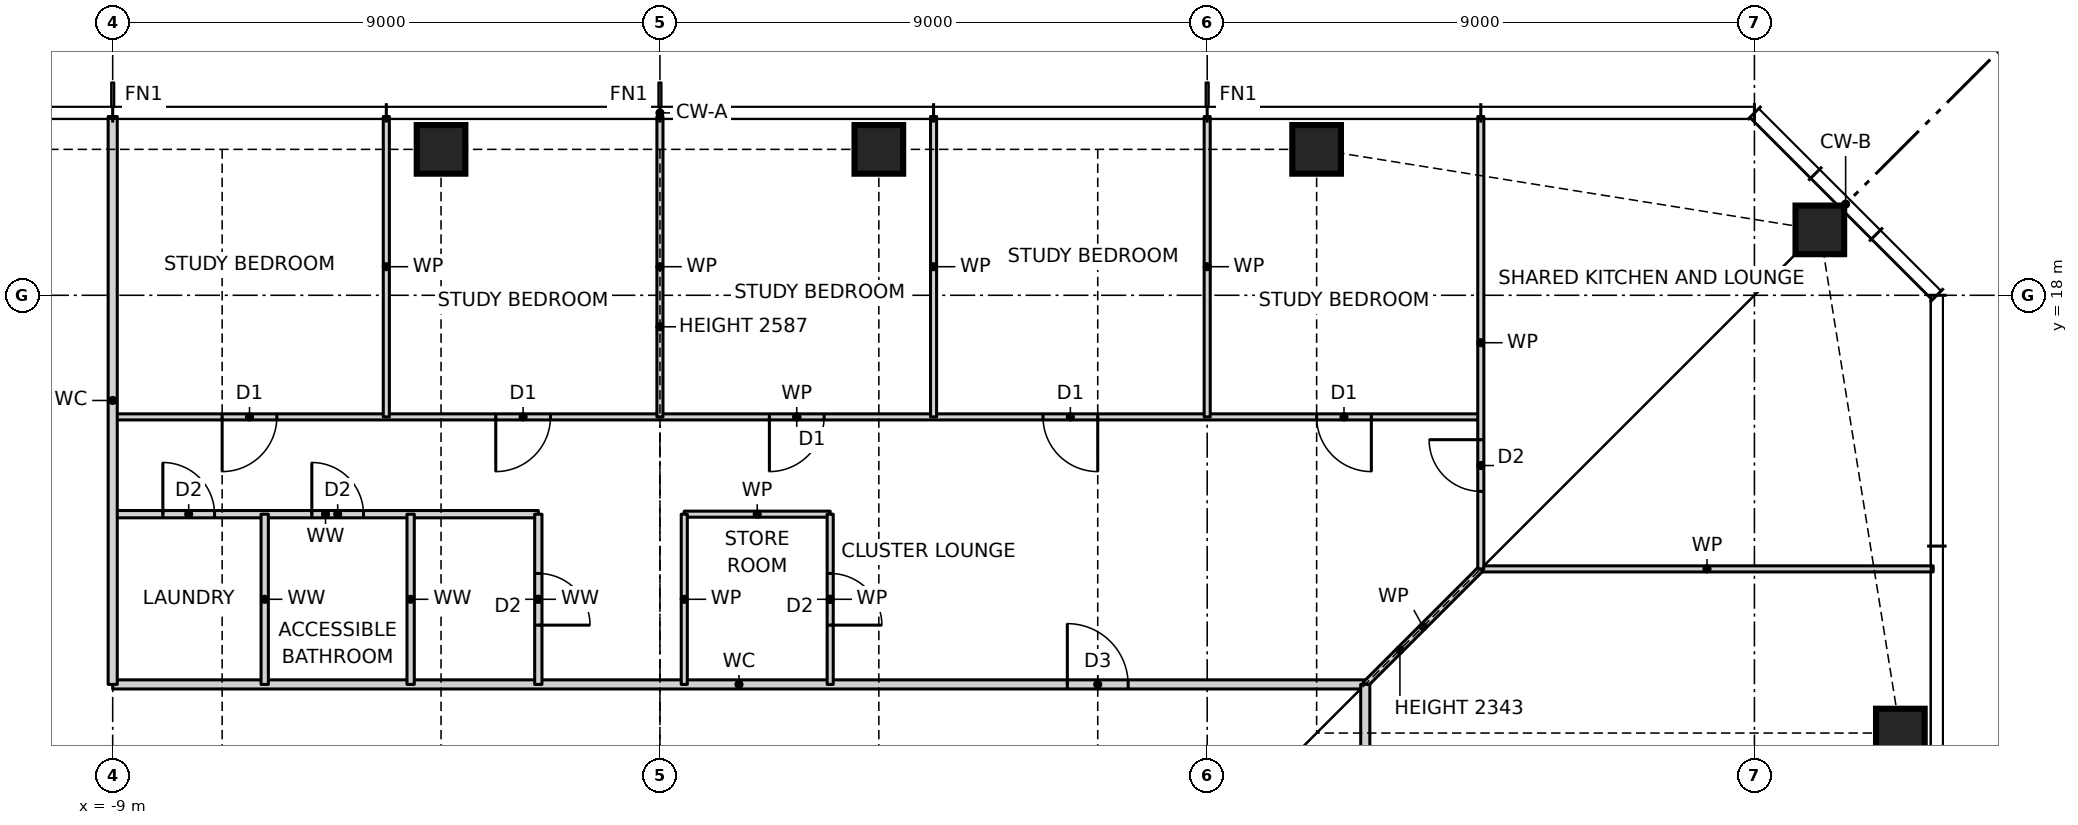
"""IFC4 building model, lengths in metres.
Left out: names, types, materials, properties, quantities, classifications, styles, units other than length and angle.
Written with IfcOpenShell. Run it as: python <this file> out.ifc"""

import sys

from ifc_helpers import new_model, si_unit, direction, frame, frame_2d, origin, origin_2d, place, context, subcontext, project, spatial, rectangle, hollow_rectangle, extrude, element, fill, save


model = new_model("IFC4")
c1 = context("Model", 3, precision=1e-05, world=origin(), true_north=direction((0.0, 1.0)))
c2 = subcontext(c1, "Body", "Model", "MODEL_VIEW")
j1 = project(units=[si_unit("LENGTHUNIT", "METRE"), si_unit("PLANEANGLEUNIT", "RADIAN")], contexts=[c1])
p1 = place(None, origin())
s1 = spatial("IfcSite", under=j1, at=p1, CompositionType="ELEMENT")
p2 = place(p1, origin())
s2 = spatial("IfcBuilding", under=s1, at=p2, CompositionType="ELEMENT")
p3 = place(p2, frame((0.0, 0.0, 129.5)))
s3 = spatial("IfcBuildingStorey", under=s2, at=p3, CompositionType="ELEMENT", Elevation=129.5)
for number, where, z_axis, x_axis in (
    (1, (20.4, 10.8, 0.0), (0.0, 0.0, 1.0), (1.0, 0.0, 0.0)),
    (2, (19.076, 19.076, 0.0), (0.0, 0.0, 1.0), (1.0, 0.0, 0.0)),
    (3, (10.8, 20.4, 0.0), (0.0, 0.0, 1.0), (1.0, 0.0, 0.0)),
    (4, (3.6, 20.4, 0.0), (0.0, 0.0, 1.0), (1.0, 0.0, 0.0)),
    (5, (-3.6, 20.4, 0.0), (0.0, 0.0, 1.0), (1.0, 0.0, 0.0)),
):
    element("IfcColumn", number, at=place(p3, frame(where, z_axis=z_axis, x_axis=x_axis)), inside=s3, PredefinedType="COLUMN", context=c2, shape_type="SweptSolid", body=[
        extrude(hollow_rectangle(XDim=0.8, YDim=0.8, WallThickness=0.07, at=origin_2d()), origin(), (0.0, 0.0, 1.0), 3.5),
    ])
p4 = place(p3, frame((-9.0, 11.6, 0.0), z_axis=(0.0, 0.0, 1.0), x_axis=(1.0, 0.0, 0.0)))
e6 = element("IfcWall", 6, at=p4, inside=s3, PredefinedType="PARTITIONING", context=c2, shape_type="SweptSolid", body=[
    extrude(rectangle(XDim=20.6, YDim=0.15, at=frame_2d((10.3, 0.0))), origin(), (0.0, 0.0, 1.0), 3.27),
])
p5 = place(p4, frame((15.7, 0.0, 0.0)))
e7 = element("IfcOpeningElement", 7, at=p5, cuts=e6, PredefinedType="OPENING", context=c2, shape_type="SweptSolid", body=[
    extrude(rectangle(XDim=1.0, YDim=2.1, at=frame_2d((0.5, 1.05))), frame((0.0, 0.085, 0.0), z_axis=(0.0, -1.0, 0.0), x_axis=(1.0, 0.0, 0.0)), (0.0, 0.0, 1.0), 0.17),
])
p6 = place(p3, frame((13.5, 13.5, 0.0), z_axis=(0.0, 0.0, 1.0), x_axis=(1.0, 0.0, 0.0)))
e8 = element("IfcWall", 8, at=p6, inside=s3, PredefinedType="PARTITIONING", context=c2, shape_type="SweptSolid", body=[
    extrude(rectangle(XDim=7.44, YDim=0.1, at=frame_2d((3.72, 0.0))), origin(), (0.0, 0.0, 1.0), 3.27),
])
p7 = place(p3, frame((-9.0, 14.4, 0.0), z_axis=(0.0, 0.0, 1.0), x_axis=(1.0, 0.0, 0.0)))
e9 = element("IfcWall", 9, at=p7, inside=s3, PredefinedType="PARTITIONING", context=c2, shape_type="SweptSolid", body=[
    extrude(rectangle(XDim=7.0, YDim=0.12, at=frame_2d((3.5, 0.0))), origin(), (0.0, 0.0, 1.0), 3.27),
])
p8 = place(p7, frame((3.275, 0.0, 0.0)))
e10 = element("IfcOpeningElement", 10, at=p8, cuts=e9, PredefinedType="OPENING", context=c2, shape_type="SweptSolid", body=[
    extrude(rectangle(XDim=0.85, YDim=2.1, at=frame_2d((0.425, 1.05))), frame((0.0, 0.07, 0.0), z_axis=(0.0, -1.0, 0.0), x_axis=(1.0, 0.0, 0.0)), (0.0, 0.0, 1.0), 0.14),
])
p9 = place(p7, frame((0.825, 0.0, 0.0)))
e11 = element("IfcOpeningElement", 11, at=p9, cuts=e9, PredefinedType="OPENING", context=c2, shape_type="SweptSolid", body=[
    extrude(rectangle(XDim=0.85, YDim=2.1, at=frame_2d((0.425, 1.05))), frame((0.0, 0.07, 0.0), z_axis=(0.0, -1.0, 0.0), x_axis=(1.0, 0.0, 0.0)), (0.0, 0.0, 1.0), 0.14),
])
p10 = place(p3, frame((0.4, 14.4, 0.0), z_axis=(0.0, 0.0, 1.0), x_axis=(1.0, 0.0, 0.0)))
e12 = element("IfcWall", 12, at=p10, inside=s3, PredefinedType="PARTITIONING", context=c2, shape_type="SweptSolid", body=[
    extrude(rectangle(XDim=2.4, YDim=0.1, at=frame_2d((1.2, 0.0))), origin(), (0.0, 0.0, 1.0), 3.27),
])
p11 = place(p3, frame((-9.0, 16.0, 0.0), z_axis=(0.0, 0.0, 1.0), x_axis=(1.0, 0.0, 0.0)))
e13 = element("IfcWall", 13, at=p11, inside=s3, PredefinedType="PARTITIONING", context=c2, shape_type="SweptSolid", body=[
    extrude(rectangle(XDim=22.5, YDim=0.1, at=frame_2d((11.25, 0.0))), origin(), (0.0, 0.0, 1.0), 3.27),
])
p12 = place(p11, frame((19.8, 0.0, 0.0)))
e14 = element("IfcOpeningElement", 14, at=p12, cuts=e13, PredefinedType="OPENING", context=c2, shape_type="SweptSolid", body=[
    extrude(rectangle(XDim=0.9, YDim=2.1, at=frame_2d((0.45, 1.05))), frame((0.0, 0.06, 0.0), z_axis=(0.0, -1.0, 0.0), x_axis=(1.0, 0.0, 0.0)), (0.0, 0.0, 1.0), 0.12),
])
p13 = place(p11, frame((15.3, 0.0, 0.0)))
e15 = element("IfcOpeningElement", 15, at=p13, cuts=e13, PredefinedType="OPENING", context=c2, shape_type="SweptSolid", body=[
    extrude(rectangle(XDim=0.9, YDim=2.1, at=frame_2d((0.45, 1.05))), frame((0.0, 0.06, 0.0), z_axis=(0.0, -1.0, 0.0), x_axis=(1.0, 0.0, 0.0)), (0.0, 0.0, 1.0), 0.12),
])
p14 = place(p11, frame((10.8, 0.0, 0.0)))
e16 = element("IfcOpeningElement", 16, at=p14, cuts=e13, PredefinedType="OPENING", context=c2, shape_type="SweptSolid", body=[
    extrude(rectangle(XDim=0.9, YDim=2.1, at=frame_2d((0.45, 1.05))), frame((0.0, 0.06, 0.0), z_axis=(0.0, -1.0, 0.0), x_axis=(1.0, 0.0, 0.0)), (0.0, 0.0, 1.0), 0.12),
])
p15 = place(p11, frame((6.3, 0.0, 0.0)))
e17 = element("IfcOpeningElement", 17, at=p15, cuts=e13, PredefinedType="OPENING", context=c2, shape_type="SweptSolid", body=[
    extrude(rectangle(XDim=0.9, YDim=2.1, at=frame_2d((0.45, 1.05))), frame((0.0, 0.06, 0.0), z_axis=(0.0, -1.0, 0.0), x_axis=(1.0, 0.0, 0.0)), (0.0, 0.0, 1.0), 0.12),
])
p16 = place(p11, frame((1.8, 0.0, 0.0)))
e18 = element("IfcOpeningElement", 18, at=p16, cuts=e13, PredefinedType="OPENING", context=c2, shape_type="SweptSolid", body=[
    extrude(rectangle(XDim=0.9, YDim=2.1, at=frame_2d((0.45, 1.05))), frame((0.0, 0.06, 0.0), z_axis=(0.0, -1.0, 0.0), x_axis=(1.0, 0.0, 0.0)), (0.0, 0.0, 1.0), 0.12),
])
p17 = place(p3, frame((11.6, 11.6, 0.0), z_axis=(0.0, 0.0, 1.0), x_axis=(0.707106781187, 0.707106781187, 0.0)))
e19 = element("IfcWall", 19, at=p17, inside=s3, PredefinedType="PARTITIONING", context=c2, shape_type="SweptSolid", body=[
    extrude(rectangle(XDim=2.687, YDim=0.1, at=frame_2d((1.343, 0.0))), origin(), (0.0, 0.0, 1.0), 2.343),
])
p18 = place(p3, frame((13.5, 13.5, 0.0), z_axis=(0.0, 0.0, 1.0), x_axis=(0.0, 1.0, 0.0)))
e20 = element("IfcWall", 20, at=p18, inside=s3, PredefinedType="PARTITIONING", context=c2, shape_type="SweptSolid", body=[
    extrude(rectangle(XDim=7.44, YDim=0.1, at=frame_2d((3.72, 0.0))), origin(), (0.0, 0.0, 1.0), 3.27),
])
p19 = place(p18, frame((1.275, 0.0, 0.0)))
e21 = element("IfcOpeningElement", 21, at=p19, cuts=e20, PredefinedType="OPENING", context=c2, shape_type="SweptSolid", body=[
    extrude(rectangle(XDim=0.85, YDim=2.1, at=frame_2d((0.425, 1.05))), frame((0.0, 0.06, 0.0), z_axis=(0.0, -1.0, 0.0), x_axis=(1.0, 0.0, 0.0)), (0.0, 0.0, 1.0), 0.12),
])
p20 = place(p3, frame((11.6, -12.4, 0.0), z_axis=(0.0, 0.0, 1.0), x_axis=(0.0, 1.0, 0.0)))
e22 = element("IfcWall", 22, at=p20, inside=s3, PredefinedType="PARTITIONING", context=c2, shape_type="SweptSolid", body=[
    extrude(rectangle(XDim=24.0, YDim=0.15, at=frame_2d((12.0, 0.0))), origin(), (0.0, 0.0, 1.0), 3.27),
])
p21 = place(p20, frame((4.95, 0.0, 0.0)))
e23 = element("IfcOpeningElement", 23, at=p21, cuts=e22, PredefinedType="OPENING", context=c2, shape_type="SweptSolid", body=[
    extrude(rectangle(XDim=1.8, YDim=2.1, at=frame_2d((0.9, 1.05))), frame((0.0, 0.085, 0.0), z_axis=(0.0, -1.0, 0.0), x_axis=(1.0, 0.0, 0.0)), (0.0, 0.0, 1.0), 0.17),
])
p22 = place(p20, frame((11.5, 0.0, 0.0)))
e24 = element("IfcOpeningElement", 24, at=p22, cuts=e22, PredefinedType="OPENING", context=c2, shape_type="SweptSolid", body=[
    extrude(rectangle(XDim=1.8, YDim=2.1, at=frame_2d((0.9, 1.05))), frame((0.0, 0.085, 0.0), z_axis=(0.0, -1.0, 0.0), x_axis=(1.0, 0.0, 0.0)), (0.0, 0.0, 1.0), 0.17),
])
p23 = place(p20, frame((18.05, 0.0, 0.0)))
e25 = element("IfcOpeningElement", 25, at=p23, cuts=e22, PredefinedType="OPENING", context=c2, shape_type="SweptSolid", body=[
    extrude(rectangle(XDim=1.8, YDim=2.1, at=frame_2d((0.9, 1.05))), frame((0.0, 0.085, 0.0), z_axis=(0.0, -1.0, 0.0), x_axis=(1.0, 0.0, 0.0)), (0.0, 0.0, 1.0), 0.17),
])
for number, where, z_axis, x_axis in (
    (26, (9.0, 16.0, 0.0), (0.0, 0.0, 1.0), (0.0, 1.0, 0.0)),
    (27, (4.5, 16.0, 0.0), (0.0, 0.0, 1.0), (0.0, 1.0, 0.0)),
):
    element("IfcWall", number, at=place(p3, frame(where, z_axis=z_axis, x_axis=x_axis)), inside=s3, PredefinedType="PARTITIONING", context=c2, shape_type="SweptSolid", body=[
        extrude(rectangle(XDim=4.94, YDim=0.1, at=frame_2d((2.47, 0.0))), origin(), (0.0, 0.0, 1.0), 3.27),
    ])
p24 = place(p3, frame((2.8, 11.6, 0.0), z_axis=(0.0, 0.0, 1.0), x_axis=(0.0, 1.0, 0.0)))
e28 = element("IfcWall", 28, at=p24, inside=s3, PredefinedType="PARTITIONING", context=c2, shape_type="SweptSolid", body=[
    extrude(rectangle(XDim=2.8, YDim=0.1, at=frame_2d((1.4, 0.0))), origin(), (0.0, 0.0, 1.0), 3.27),
])
p25 = place(p24, frame((0.975, 0.0, 0.0)))
e29 = element("IfcOpeningElement", 29, at=p25, cuts=e28, PredefinedType="OPENING", context=c2, shape_type="SweptSolid", body=[
    extrude(rectangle(XDim=0.85, YDim=2.1, at=frame_2d((0.425, 1.05))), frame((0.0, 0.06, 0.0), z_axis=(0.0, -1.0, 0.0), x_axis=(1.0, 0.0, 0.0)), (0.0, 0.0, 1.0), 0.12),
])
p26 = place(p3, frame((0.4, 11.6, 0.0), z_axis=(0.0, 0.0, 1.0), x_axis=(0.0, 1.0, 0.0)))
e30 = element("IfcWall", 30, at=p26, inside=s3, PredefinedType="PARTITIONING", context=c2, shape_type="SweptSolid", body=[
    extrude(rectangle(XDim=2.8, YDim=0.1, at=frame_2d((1.4, 0.0))), origin(), (0.0, 0.0, 1.0), 3.27),
])
p27 = place(p3, frame((0.0, 16.0, 0.0), z_axis=(0.0, 0.0, 1.0), x_axis=(0.0, 1.0, 0.0)))
e31 = element("IfcWall", 31, at=p27, inside=s3, PredefinedType="PARTITIONING", context=c2, shape_type="SweptSolid", body=[
    extrude(rectangle(XDim=4.94, YDim=0.1, at=frame_2d((2.47, 0.0))), origin(), (0.0, 0.0, 1.0), 2.587),
])
p28 = place(p3, frame((-2.0, 11.6, 0.0), z_axis=(0.0, 0.0, 1.0), x_axis=(0.0, 1.0, 0.0)))
e32 = element("IfcWall", 32, at=p28, inside=s3, PredefinedType="PARTITIONING", context=c2, shape_type="SweptSolid", body=[
    extrude(rectangle(XDim=2.8, YDim=0.12, at=frame_2d((1.4, 0.0))), origin(), (0.0, 0.0, 1.0), 3.27),
])
p29 = place(p28, frame((0.975, 0.0, 0.0)))
e33 = element("IfcOpeningElement", 33, at=p29, cuts=e32, PredefinedType="OPENING", context=c2, shape_type="SweptSolid", body=[
    extrude(rectangle(XDim=0.85, YDim=2.1, at=frame_2d((0.425, 1.05))), frame((0.0, 0.07, 0.0), z_axis=(0.0, -1.0, 0.0), x_axis=(1.0, 0.0, 0.0)), (0.0, 0.0, 1.0), 0.14),
])
p30 = place(p3, frame((-4.1, 11.6, 0.0), z_axis=(0.0, 0.0, 1.0), x_axis=(0.0, 1.0, 0.0)))
e34 = element("IfcWall", 34, at=p30, inside=s3, PredefinedType="PARTITIONING", context=c2, shape_type="SweptSolid", body=[
    extrude(rectangle(XDim=2.8, YDim=0.12, at=frame_2d((1.4, 0.0))), origin(), (0.0, 0.0, 1.0), 3.27),
])
p31 = place(p3, frame((-4.5, 16.0, 0.0), z_axis=(0.0, 0.0, 1.0), x_axis=(0.0, 1.0, 0.0)))
e35 = element("IfcWall", 35, at=p31, inside=s3, PredefinedType="PARTITIONING", context=c2, shape_type="SweptSolid", body=[
    extrude(rectangle(XDim=4.94, YDim=0.1, at=frame_2d((2.47, 0.0))), origin(), (0.0, 0.0, 1.0), 3.27),
])
p32 = place(p3, frame((-6.5, 11.6, 0.0), z_axis=(0.0, 0.0, 1.0), x_axis=(0.0, 1.0, 0.0)))
e36 = element("IfcWall", 36, at=p32, inside=s3, PredefinedType="PARTITIONING", context=c2, shape_type="SweptSolid", body=[
    extrude(rectangle(XDim=2.8, YDim=0.12, at=frame_2d((1.4, 0.0))), origin(), (0.0, 0.0, 1.0), 3.27),
])
p33 = place(p3, frame((-9.0, 11.6, 0.0), z_axis=(0.0, 0.0, 1.0), x_axis=(0.0, 1.0, 0.0)))
e37 = element("IfcWall", 37, at=p33, inside=s3, PredefinedType="PARTITIONING", context=c2, shape_type="SweptSolid", body=[
    extrude(rectangle(XDim=9.34, YDim=0.15, at=frame_2d((4.67, 0.0))), origin(), (0.0, 0.0, 1.0), 3.27),
])
p34 = place(p12, frame((0.9, 0.0, 0.0), z_axis=(0.0, 0.0, 1.0), x_axis=(-1.0, 0.0, 0.0)))
e38 = element("IfcDoor", 38, at=p34, inside=s3, OperationType="SINGLE_SWING_LEFT", PredefinedType="DOOR", context=c2, shape_type="SweptSolid", body=[
    extrude(rectangle(XDim=0.9, YDim=2.1, at=frame_2d((0.45, 1.05))), frame((0.0, 0.025, 0.0), z_axis=(0.0, -1.0, 0.0), x_axis=(1.0, 0.0, 0.0)), (0.0, 0.0, 1.0), 0.05),
])
fill(e14, e38)
p35 = place(p13, frame((0.9, 0.0, 0.0), z_axis=(0.0, 0.0, 1.0), x_axis=(-1.0, 0.0, 0.0)))
e39 = element("IfcDoor", 39, at=p35, inside=s3, OperationType="SINGLE_SWING_LEFT", PredefinedType="DOOR", context=c2, shape_type="SweptSolid", body=[
    extrude(rectangle(XDim=0.9, YDim=2.1, at=frame_2d((0.45, 1.05))), frame((0.0, 0.025, 0.0), z_axis=(0.0, -1.0, 0.0), x_axis=(1.0, 0.0, 0.0)), (0.0, 0.0, 1.0), 0.05),
])
fill(e15, e39)
p36 = place(p14, frame((0.9, 0.0, 0.0), z_axis=(0.0, 0.0, 1.0), x_axis=(-1.0, 0.0, 0.0)))
e40 = element("IfcDoor", 40, at=p36, inside=s3, OperationType="SINGLE_SWING_RIGHT", PredefinedType="DOOR", context=c2, shape_type="SweptSolid", body=[
    extrude(rectangle(XDim=0.9, YDim=2.1, at=frame_2d((0.45, 1.05))), frame((0.0, 0.025, 0.0), z_axis=(0.0, -1.0, 0.0), x_axis=(1.0, 0.0, 0.0)), (0.0, 0.0, 1.0), 0.05),
])
fill(e16, e40)
p37 = place(p15, frame((0.9, 0.0, 0.0), z_axis=(0.0, 0.0, 1.0), x_axis=(-1.0, 0.0, 0.0)))
e41 = element("IfcDoor", 41, at=p37, inside=s3, OperationType="SINGLE_SWING_RIGHT", PredefinedType="DOOR", context=c2, shape_type="SweptSolid", body=[
    extrude(rectangle(XDim=0.9, YDim=2.1, at=frame_2d((0.45, 1.05))), frame((0.0, 0.025, 0.0), z_axis=(0.0, -1.0, 0.0), x_axis=(1.0, 0.0, 0.0)), (0.0, 0.0, 1.0), 0.05),
])
fill(e17, e41)
p38 = place(p16, frame((0.9, 0.0, 0.0), z_axis=(0.0, 0.0, 1.0), x_axis=(-1.0, 0.0, 0.0)))
e42 = element("IfcDoor", 42, at=p38, inside=s3, OperationType="SINGLE_SWING_RIGHT", PredefinedType="DOOR", context=c2, shape_type="SweptSolid", body=[
    extrude(rectangle(XDim=0.9, YDim=2.1, at=frame_2d((0.45, 1.05))), frame((0.0, 0.025, 0.0), z_axis=(0.0, -1.0, 0.0), x_axis=(1.0, 0.0, 0.0)), (0.0, 0.0, 1.0), 0.05),
])
fill(e18, e42)
p39 = place(p5, origin())
e43 = element("IfcDoor", 43, at=p39, inside=s3, OperationType="SINGLE_SWING_LEFT", PredefinedType="DOOR", context=c2, shape_type="SweptSolid", body=[
    extrude(rectangle(XDim=1.0, YDim=2.1, at=frame_2d((0.5, 1.05))), frame((0.0, 0.025, 0.0), z_axis=(0.0, -1.0, 0.0), x_axis=(1.0, 0.0, 0.0)), (0.0, 0.0, 1.0), 0.05),
])
fill(e7, e43)
p40 = place(p25, frame((0.85, 0.0, 0.0), z_axis=(0.0, 0.0, 1.0), x_axis=(-1.0, 0.0, 0.0)))
e44 = element("IfcDoor", 44, at=p40, inside=s3, OperationType="SINGLE_SWING_RIGHT", PredefinedType="DOOR", context=c2, shape_type="SweptSolid", body=[
    extrude(rectangle(XDim=0.85, YDim=2.1, at=frame_2d((0.425, 1.05))), frame((0.0, 0.025, 0.0), z_axis=(0.0, -1.0, 0.0), x_axis=(1.0, 0.0, 0.0)), (0.0, 0.0, 1.0), 0.05),
])
fill(e29, e44)
p41 = place(p29, frame((0.85, 0.0, 0.0), z_axis=(0.0, 0.0, 1.0), x_axis=(-1.0, 0.0, 0.0)))
e45 = element("IfcDoor", 45, at=p41, inside=s3, OperationType="SINGLE_SWING_RIGHT", PredefinedType="DOOR", context=c2, shape_type="SweptSolid", body=[
    extrude(rectangle(XDim=0.85, YDim=2.1, at=frame_2d((0.425, 1.05))), frame((0.0, 0.025, 0.0), z_axis=(0.0, -1.0, 0.0), x_axis=(1.0, 0.0, 0.0)), (0.0, 0.0, 1.0), 0.05),
])
fill(e33, e45)
p42 = place(p8, origin())
e46 = element("IfcDoor", 46, at=p42, inside=s3, OperationType="SINGLE_SWING_LEFT", PredefinedType="DOOR", context=c2, shape_type="SweptSolid", body=[
    extrude(rectangle(XDim=0.85, YDim=2.1, at=frame_2d((0.425, 1.05))), frame((0.0, 0.025, 0.0), z_axis=(0.0, -1.0, 0.0), x_axis=(1.0, 0.0, 0.0)), (0.0, 0.0, 1.0), 0.05),
])
fill(e10, e46)
p43 = place(p9, origin())
e47 = element("IfcDoor", 47, at=p43, inside=s3, OperationType="SINGLE_SWING_LEFT", PredefinedType="DOOR", context=c2, shape_type="SweptSolid", body=[
    extrude(rectangle(XDim=0.85, YDim=2.1, at=frame_2d((0.425, 1.05))), frame((0.0, 0.025, 0.0), z_axis=(0.0, -1.0, 0.0), x_axis=(1.0, 0.0, 0.0)), (0.0, 0.0, 1.0), 0.05),
])
fill(e11, e47)
p44 = place(p19, origin())
e48 = element("IfcDoor", 48, at=p44, inside=s3, OperationType="SINGLE_SWING_RIGHT", PredefinedType="DOOR", context=c2, shape_type="SweptSolid", body=[
    extrude(rectangle(XDim=0.85, YDim=2.1, at=frame_2d((0.425, 1.05))), frame((0.0, 0.025, 0.0), z_axis=(0.0, -1.0, 0.0), x_axis=(1.0, 0.0, 0.0)), (0.0, 0.0, 1.0), 0.05),
])
fill(e21, e48)
save(model, sys.argv[1])
